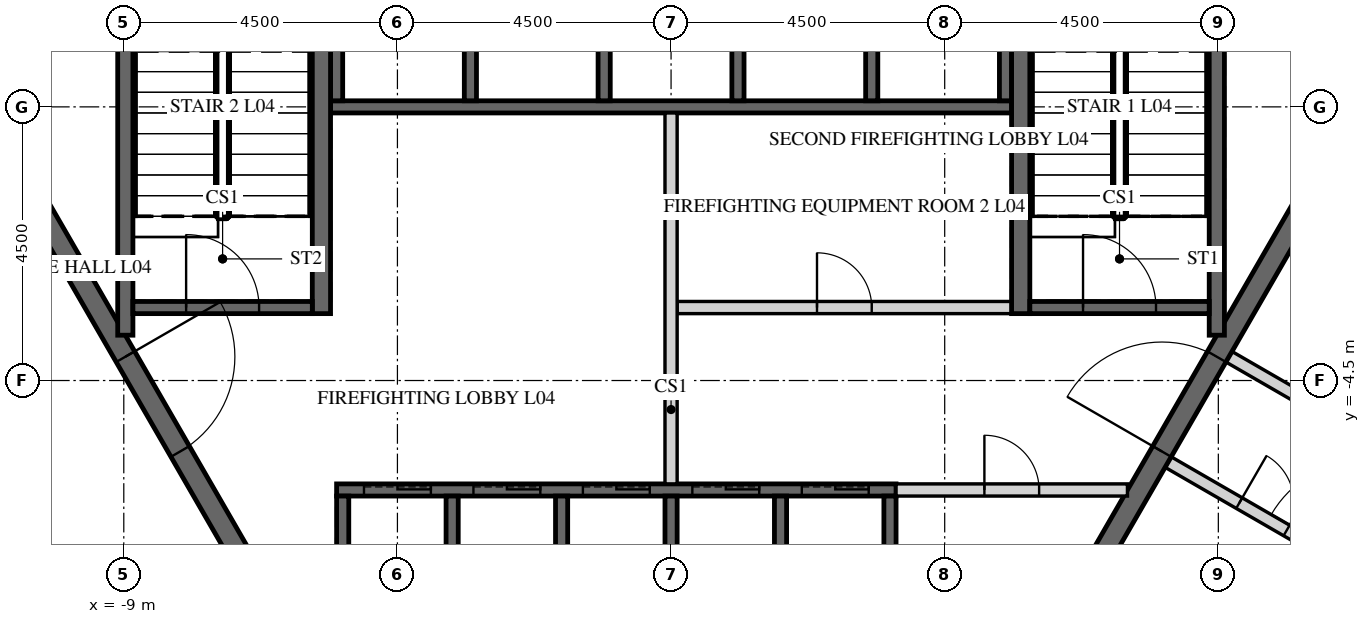
"""IFC4 building model, lengths in metres.
Left out: names, types, materials, properties, quantities, classifications, styles, units other than length and angle.
Written with IfcOpenShell. Run it as: python <this file> out.ifc"""

import sys

from ifc_helpers import new_model, si_unit, direction, frame, frame_2d, origin, place, context, subcontext, project, spatial, polyline, rectangle, outline, extrude, element, fill, save


model = new_model("IFC4")
c1 = context("Model", 3, precision=1e-05, world=origin(), true_north=direction((0.0, 1.0)))
c2 = subcontext(c1, "Body", "Model", "MODEL_VIEW")
j1 = project(units=[si_unit("LENGTHUNIT", "METRE"), si_unit("PLANEANGLEUNIT", "RADIAN")], contexts=[c1])
p1 = place(None, origin())
s1 = spatial("IfcSite", under=j1, at=p1, CompositionType="ELEMENT")
p2 = place(p1, origin())
s2 = spatial("IfcBuilding", under=s1, at=p2, CompositionType="ELEMENT")
p3 = place(p2, frame((0.0, 0.0, 26.0)))
s3 = spatial("IfcBuildingStorey", under=s2, at=p3, CompositionType="ELEMENT", Elevation=26.0)
p4 = place(p3, frame((-7.91, 13.7, -0.25), z_axis=(0.0, 0.0, 1.0), x_axis=(-0.499999880136, -0.866025472988, 0.0)))
e1 = element("IfcWall", 1, at=p4, inside=s3, PredefinedType="SHEAR", context=c2, shape_type="SweptSolid", body=[
    extrude(outline(polyline([(-0.173, -0.3), (15.993, -0.3), (15.646, 0.3), (0.173, 0.3), (-0.173, -0.3)])), origin(), (0.0, 0.0, 1.0), 5.45),
])
p5 = place(p4, frame((7.039, 0.0, 0.25)))
e2 = element("IfcOpeningElement", 2, at=p5, cuts=e1, PredefinedType="OPENING", context=c2, shape_type="SweptSolid", body=[
    extrude(rectangle(XDim=1.8, YDim=2.4, at=frame_2d((0.9, 1.2))), frame((0.0, 0.31, 0.0), z_axis=(0.0, -1.0, 0.0), x_axis=(1.0, 0.0, 0.0)), (0.0, 0.0, 1.0), 0.62),
])
p6 = place(p3, frame((-15.819, 0.0, -0.25), z_axis=(0.0, 0.0, 1.0), x_axis=(0.499999880136, -0.866025472988, 0.0)))
e3 = element("IfcWall", 3, at=p6, inside=s3, PredefinedType="SHEAR", context=c2, shape_type="SweptSolid", body=[
    extrude(outline(polyline([(-0.173, -0.3), (15.993, -0.3), (15.646, 0.3), (0.173, 0.3), (-0.173, -0.3)])), origin(), (0.0, 0.0, 1.0), 5.45),
])
p7 = place(p6, frame((6.981, 0.0, 0.25)))
e4 = element("IfcOpeningElement", 4, at=p7, cuts=e3, PredefinedType="OPENING", context=c2, shape_type="SweptSolid", body=[
    extrude(rectangle(XDim=1.8, YDim=2.4, at=frame_2d((0.9, 1.2))), frame((0.0, 0.31, 0.0), z_axis=(0.0, -1.0, 0.0), x_axis=(1.0, 0.0, 0.0)), (0.0, 0.0, 1.0), 0.62),
])
p8 = place(p3, frame((7.91, -13.7, -0.25), z_axis=(0.0, 0.0, 1.0), x_axis=(0.499999880136, 0.866025472988, 0.0)))
e5 = element("IfcWall", 5, at=p8, inside=s3, PredefinedType="SHEAR", context=c2, shape_type="SweptSolid", body=[
    extrude(outline(polyline([(-0.173, -0.3), (15.993, -0.3), (15.646, 0.3), (0.173, 0.3), (-0.173, -0.3)])), origin(), (0.0, 0.0, 1.0), 5.45),
])
p9 = place(p8, frame((7.039, 0.0, 0.25)))
e6 = element("IfcOpeningElement", 6, at=p9, cuts=e5, PredefinedType="OPENING", context=c2, shape_type="SweptSolid", body=[
    extrude(rectangle(XDim=1.8, YDim=2.4, at=frame_2d((0.9, 1.2))), frame((0.0, 0.31, 0.0), z_axis=(0.0, -1.0, 0.0), x_axis=(1.0, 0.0, 0.0)), (0.0, 0.0, 1.0), 0.62),
])
p10 = place(p3, frame((15.819, 0.0, -0.25), z_axis=(0.0, 0.0, 1.0), x_axis=(-0.499999880136, 0.866025472988, 0.0)))
e7 = element("IfcWall", 7, at=p10, inside=s3, PredefinedType="SHEAR", context=c2, shape_type="SweptSolid", body=[
    extrude(outline(polyline([(-0.173, -0.3), (15.993, -0.3), (15.646, 0.3), (0.173, 0.3), (-0.173, -0.3)])), origin(), (0.0, 0.0, 1.0), 5.45),
])
p11 = place(p10, frame((6.981, 0.0, 0.25)))
e8 = element("IfcOpeningElement", 8, at=p11, cuts=e7, PredefinedType="OPENING", context=c2, shape_type="SweptSolid", body=[
    extrude(rectangle(XDim=1.8, YDim=2.4, at=frame_2d((0.9, 1.2))), frame((0.0, 0.31, 0.0), z_axis=(0.0, -1.0, 0.0), x_axis=(1.0, 0.0, 0.0)), (0.0, 0.0, 1.0), 0.62),
])
p12 = place(p3, frame((-5.673, 9.825, -0.25), z_axis=(0.0, 0.0, 1.0), x_axis=(-0.499995046907, -0.866028263435, 0.0)))
e9 = element("IfcWall", 9, at=p12, inside=s3, PredefinedType="SHEAR", context=c2, shape_type="SweptSolid", body=[
    extrude(outline(polyline([(-0.101, -0.175), (11.446, -0.175), (11.244, 0.175), (0.101, 0.175), (-0.101, -0.175)])), origin(), (0.0, 0.0, 1.0), 5.45),
])
p13 = place(p12, frame((4.801, 0.0, 0.25)))
e10 = element("IfcOpeningElement", 10, at=p13, cuts=e9, PredefinedType="OPENING", context=c2, shape_type="SweptSolid", body=[
    extrude(rectangle(XDim=1.8, YDim=2.4, at=frame_2d((0.9, 1.2))), frame((0.0, 0.185, 0.0), z_axis=(0.0, -1.0, 0.0), x_axis=(1.0, 0.0, 0.0)), (0.0, 0.0, 1.0), 0.37),
])
p14 = place(p3, frame((-11.345, 0.0, -0.25), z_axis=(0.0, 0.0, 1.0), x_axis=(0.499995046907, -0.866028263435, 0.0)))
e11 = element("IfcWall", 11, at=p14, inside=s3, PredefinedType="SHEAR", context=c2, shape_type="SweptSolid", body=[
    extrude(outline(polyline([(-0.101, -0.175), (11.446, -0.175), (11.244, 0.175), (0.101, 0.175), (-0.101, -0.175)])), origin(), (0.0, 0.0, 1.0), 5.45),
])
p15 = place(p14, frame((4.744, 0.0, 0.25)))
e12 = element("IfcOpeningElement", 12, at=p15, cuts=e11, PredefinedType="OPENING", context=c2, shape_type="SweptSolid", body=[
    extrude(rectangle(XDim=1.8, YDim=2.4, at=frame_2d((0.9, 1.2))), frame((0.0, 0.185, 0.0), z_axis=(0.0, -1.0, 0.0), x_axis=(1.0, 0.0, 0.0)), (0.0, 0.0, 1.0), 0.37),
])
p16 = place(p3, frame((5.673, -9.825, -0.25), z_axis=(0.0, 0.0, 1.0), x_axis=(0.499995046907, 0.866028263435, 0.0)))
e13 = element("IfcWall", 13, at=p16, inside=s3, PredefinedType="SHEAR", context=c2, shape_type="SweptSolid", body=[
    extrude(outline(polyline([(-0.101, -0.175), (11.446, -0.175), (11.244, 0.175), (0.101, 0.175), (-0.101, -0.175)])), origin(), (0.0, 0.0, 1.0), 5.45),
])
p17 = place(p16, frame((4.801, 0.0, 0.25)))
e14 = element("IfcOpeningElement", 14, at=p17, cuts=e13, PredefinedType="OPENING", context=c2, shape_type="SweptSolid", body=[
    extrude(rectangle(XDim=1.8, YDim=2.4, at=frame_2d((0.9, 1.2))), frame((0.0, 0.185, 0.0), z_axis=(0.0, -1.0, 0.0), x_axis=(1.0, 0.0, 0.0)), (0.0, 0.0, 1.0), 0.37),
])
p18 = place(p3, frame((11.345, 0.0, -0.25), z_axis=(0.0, 0.0, 1.0), x_axis=(-0.499995046907, 0.866028263435, 0.0)))
e15 = element("IfcWall", 15, at=p18, inside=s3, PredefinedType="SHEAR", context=c2, shape_type="SweptSolid", body=[
    extrude(outline(polyline([(-0.101, -0.175), (11.446, -0.175), (11.244, 0.175), (0.101, 0.175), (-0.101, -0.175)])), origin(), (0.0, 0.0, 1.0), 5.45),
])
p19 = place(p18, frame((4.744, 0.0, 0.25)))
e16 = element("IfcOpeningElement", 16, at=p19, cuts=e15, PredefinedType="OPENING", context=c2, shape_type="SweptSolid", body=[
    extrude(rectangle(XDim=1.8, YDim=2.4, at=frame_2d((0.9, 1.2))), frame((0.0, 0.185, 0.0), z_axis=(0.0, -1.0, 0.0), x_axis=(1.0, 0.0, 0.0)), (0.0, 0.0, 1.0), 0.37),
])
p20 = place(p3, frame((-5.6, 0.0, -0.25), z_axis=(0.0, 0.0, 1.0), x_axis=(1.0, 0.0, 0.0)))
e17 = element("IfcWall", 17, at=p20, inside=s3, PredefinedType="SHEAR", context=c2, shape_type="SweptSolid", body=[
    extrude(rectangle(XDim=11.2, YDim=0.2, at=frame_2d((5.6, 0.0))), origin(), (0.0, 0.0, 1.0), 5.5),
])
for number, where, z_axis, x_axis in (
    (18, (-5.5, 0.1, -0.25), (0.0, 0.0, 1.0), (0.0, 1.0, 0.0)),
    (19, (-3.3, 0.1, -0.25), (0.0, 0.0, 1.0), (0.0, 1.0, 0.0)),
    (20, (-1.1, 0.1, -0.25), (0.0, 0.0, 1.0), (0.0, 1.0, 0.0)),
    (21, (1.1, 0.1, -0.25), (0.0, 0.0, 1.0), (0.0, 1.0, 0.0)),
    (22, (3.3, 0.1, -0.25), (0.0, 0.0, 1.0), (0.0, 1.0, 0.0)),
    (23, (5.5, 0.1, -0.25), (0.0, 0.0, 1.0), (0.0, 1.0, 0.0)),
):
    element("IfcWall", number, at=place(p3, frame(where, z_axis=z_axis, x_axis=x_axis)), inside=s3, PredefinedType="SHEAR", context=c2, shape_type="SweptSolid", body=[
        extrude(rectangle(XDim=3.1, YDim=0.2, at=frame_2d((1.55, 0.0))), origin(), (0.0, 0.0, 1.0), 5.5),
    ])
p21 = place(p3, frame((-5.5, -6.3, -0.25), z_axis=(0.0, 0.0, 1.0), x_axis=(1.0, 0.0, 0.0)))
e24 = element("IfcWall", 24, at=p21, inside=s3, PredefinedType="SHEAR", context=c2, shape_type="SweptSolid", body=[
    extrude(rectangle(XDim=9.2, YDim=0.2, at=frame_2d((4.6, 0.0))), origin(), (0.0, 0.0, 1.0), 5.5),
])
p22 = place(p21, frame((0.45, 0.0, 0.25)))
e25 = element("IfcOpeningElement", 25, at=p22, cuts=e24, PredefinedType="OPENING", context=c2, shape_type="SweptSolid", body=[
    extrude(rectangle(XDim=1.1, YDim=2.1, at=frame_2d((0.55, 1.05))), frame((0.0, 0.11, 0.0), z_axis=(0.0, -1.0, 0.0), x_axis=(1.0, 0.0, 0.0)), (0.0, 0.0, 1.0), 0.22),
])
p23 = place(p21, frame((2.25, 0.0, 0.25)))
e26 = element("IfcOpeningElement", 26, at=p23, cuts=e24, PredefinedType="OPENING", context=c2, shape_type="SweptSolid", body=[
    extrude(rectangle(XDim=1.1, YDim=2.1, at=frame_2d((0.55, 1.05))), frame((0.0, 0.11, 0.0), z_axis=(0.0, -1.0, 0.0), x_axis=(1.0, 0.0, 0.0)), (0.0, 0.0, 1.0), 0.22),
])
p24 = place(p21, frame((4.05, 0.0, 0.25)))
e27 = element("IfcOpeningElement", 27, at=p24, cuts=e24, PredefinedType="OPENING", context=c2, shape_type="SweptSolid", body=[
    extrude(rectangle(XDim=1.1, YDim=2.1, at=frame_2d((0.55, 1.05))), frame((0.0, 0.11, 0.0), z_axis=(0.0, -1.0, 0.0), x_axis=(1.0, 0.0, 0.0)), (0.0, 0.0, 1.0), 0.22),
])
p25 = place(p21, frame((5.85, 0.0, 0.25)))
e28 = element("IfcOpeningElement", 28, at=p25, cuts=e24, PredefinedType="OPENING", context=c2, shape_type="SweptSolid", body=[
    extrude(rectangle(XDim=1.1, YDim=2.1, at=frame_2d((0.55, 1.05))), frame((0.0, 0.11, 0.0), z_axis=(0.0, -1.0, 0.0), x_axis=(1.0, 0.0, 0.0)), (0.0, 0.0, 1.0), 0.22),
])
p26 = place(p21, frame((7.65, 0.0, 0.25)))
e29 = element("IfcOpeningElement", 29, at=p26, cuts=e24, PredefinedType="OPENING", context=c2, shape_type="SweptSolid", body=[
    extrude(rectangle(XDim=1.1, YDim=2.1, at=frame_2d((0.55, 1.05))), frame((0.0, 0.11, 0.0), z_axis=(0.0, -1.0, 0.0), x_axis=(1.0, 0.0, 0.0)), (0.0, 0.0, 1.0), 0.22),
])
for number, where, z_axis, x_axis in (
    (30, (-5.4, -9.3, -0.25), (0.0, 0.0, 1.0), (0.0, 1.0, 0.0)),
    (31, (-3.6, -9.3, -0.25), (0.0, 0.0, 1.0), (0.0, 1.0, 0.0)),
    (32, (-1.8, -9.3, -0.25), (0.0, 0.0, 1.0), (0.0, 1.0, 0.0)),
    (33, (0.0, -9.3, -0.25), (0.0, 0.0, 1.0), (0.0, 1.0, 0.0)),
    (34, (1.8, -9.3, -0.25), (0.0, 0.0, 1.0), (0.0, 1.0, 0.0)),
    (35, (3.6, -9.3, -0.25), (0.0, 0.0, 1.0), (0.0, 1.0, 0.0)),
):
    element("IfcWall", number, at=place(p3, frame(where, z_axis=z_axis, x_axis=x_axis)), inside=s3, PredefinedType="SHEAR", context=c2, shape_type="SweptSolid", body=[
        extrude(rectangle(XDim=2.9, YDim=0.2, at=frame_2d((1.45, 0.0))), origin(), (0.0, 0.0, 1.0), 5.5),
    ])
p27 = place(p3, frame((0.1, -3.3, 0.0), z_axis=(0.0, 0.0, 1.0), x_axis=(1.0, 0.0, 0.0)))
e36 = element("IfcWall", 36, at=p27, inside=s3, PredefinedType="PARTITIONING", context=c2, shape_type="SweptSolid", body=[
    extrude(rectangle(XDim=5.5, YDim=0.2, at=frame_2d((2.75, 0.0))), origin(), (0.0, 0.0, 1.0), 5.25),
])
p28 = place(p27, frame((2.3, 0.0, 0.0)))
e37 = element("IfcOpeningElement", 37, at=p28, cuts=e36, PredefinedType="OPENING", context=c2, shape_type="SweptSolid", body=[
    extrude(rectangle(XDim=0.9, YDim=2.1, at=frame_2d((0.45, 1.05))), frame((0.0, 0.11, 0.0), z_axis=(0.0, -1.0, 0.0), x_axis=(1.0, 0.0, 0.0)), (0.0, 0.0, 1.0), 0.22),
])
p29 = place(p3, frame((0.0, -6.2, 0.0), z_axis=(0.0, 0.0, 1.0), x_axis=(0.0, 1.0, 0.0)))
e38 = element("IfcWall", 38, at=p29, inside=s3, PredefinedType="PARTITIONING", context=c2, shape_type="SweptSolid", body=[
    extrude(rectangle(XDim=6.1, YDim=0.2, at=frame_2d((3.05, 0.0))), origin(), (0.0, 0.0, 1.0), 5.25),
])
p30 = place(p3, frame((3.7, -6.3, 0.0), z_axis=(0.0, 0.0, 1.0), x_axis=(1.0, 0.0, 0.0)))
e39 = element("IfcWall", 39, at=p30, inside=s3, PredefinedType="PARTITIONING", context=c2, shape_type="SweptSolid", body=[
    extrude(rectangle(XDim=3.806, YDim=0.2, at=frame_2d((1.903, 0.0))), origin(), (0.0, 0.0, 1.0), 5.25),
])
p31 = place(p30, frame((1.453, 0.0, 0.0)))
e40 = element("IfcOpeningElement", 40, at=p31, cuts=e39, PredefinedType="OPENING", context=c2, shape_type="SweptSolid", body=[
    extrude(rectangle(XDim=0.9, YDim=2.1, at=frame_2d((0.45, 1.05))), frame((0.0, 0.11, 0.0), z_axis=(0.0, -1.0, 0.0), x_axis=(1.0, 0.0, 0.0)), (0.0, 0.0, 1.0), 0.22),
])
p32 = place(p3, frame((9.175, -4.109, 0.0), z_axis=(0.0, 0.0, 1.0), x_axis=(0.865989465428, -0.500062241894, 0.0)))
e41 = element("IfcWall", 41, at=p32, inside=s3, PredefinedType="PARTITIONING", context=c2, shape_type="SweptSolid", body=[
    extrude(rectangle(XDim=3.4, YDim=0.2, at=frame_2d((1.7, 0.0))), origin(), (0.0, 0.0, 1.0), 5.25),
])
p33 = place(p32, frame((1.351, 0.0, 0.0)))
e42 = element("IfcOpeningElement", 42, at=p33, cuts=e41, PredefinedType="OPENING", context=c2, shape_type="SweptSolid", body=[
    extrude(rectangle(XDim=0.9, YDim=2.1, at=frame_2d((0.45, 1.05))), frame((0.0, 0.11, 0.0), z_axis=(0.0, -1.0, 0.0), x_axis=(1.0, 0.0, 0.0)), (0.0, 0.0, 1.0), 0.22),
])
p34 = place(p3, frame((8.175, -5.841, 0.0), z_axis=(0.0, 0.0, 1.0), x_axis=(0.866020560687, -0.500008388397, 0.0)))
e43 = element("IfcWall", 43, at=p34, inside=s3, PredefinedType="PARTITIONING", context=c2, shape_type="SweptSolid", body=[
    extrude(rectangle(XDim=3.4, YDim=0.2, at=frame_2d((1.7, 0.0))), origin(), (0.0, 0.0, 1.0), 5.25),
])
p35 = place(p34, frame((1.35, 0.0, 0.0)))
e44 = element("IfcOpeningElement", 44, at=p35, cuts=e43, PredefinedType="OPENING", context=c2, shape_type="SweptSolid", body=[
    extrude(rectangle(XDim=0.9, YDim=2.1, at=frame_2d((0.45, 1.05))), frame((0.0, 0.11, 0.0), z_axis=(0.0, -1.0, 0.0), x_axis=(1.0, 0.0, 0.0)), (0.0, 0.0, 1.0), 0.22),
])
p36 = place(p3, frame((5.75, -3.4, -0.25), z_axis=(0.0, 0.0, 1.0), x_axis=(0.0, 1.0, 0.0)))
e45 = element("IfcWall", 45, at=p36, inside=s3, PredefinedType="SHEAR", context=c2, shape_type="SweptSolid", body=[
    extrude(rectangle(XDim=6.8, YDim=0.3, at=frame_2d((3.4, 0.0))), origin(), (0.0, 0.0, 1.0), 5.5),
])
p37 = place(p3, frame((8.975, -3.755, -0.25), z_axis=(0.0, 0.0, 1.0), x_axis=(0.0, 1.0, 0.0)))
e46 = element("IfcWall", 46, at=p37, inside=s3, PredefinedType="SHEAR", context=c2, shape_type="SweptSolid", body=[
    extrude(rectangle(XDim=7.51, YDim=0.25, at=frame_2d((3.755, 0.0))), origin(), (0.0, 0.0, 1.0), 5.5),
])
p38 = place(p3, frame((5.9, -3.3, -0.25), z_axis=(0.0, 0.0, 1.0), x_axis=(1.0, 0.0, 0.0)))
e47 = element("IfcWall", 47, at=p38, inside=s3, PredefinedType="SHEAR", context=c2, shape_type="SweptSolid", body=[
    extrude(rectangle(XDim=2.95, YDim=0.2, at=frame_2d((1.475, 0.0))), origin(), (0.0, 0.0, 1.0), 5.5),
])
p39 = place(p38, frame((0.875, 0.0, 0.25)))
e48 = element("IfcOpeningElement", 48, at=p39, cuts=e47, PredefinedType="OPENING", context=c2, shape_type="SweptSolid", body=[
    extrude(rectangle(XDim=1.2, YDim=2.4, at=frame_2d((0.6, 1.2))), frame((0.0, 0.11, 0.0), z_axis=(0.0, -1.0, 0.0), x_axis=(1.0, 0.0, 0.0)), (0.0, 0.0, 1.0), 0.22),
])
p40 = place(p3, frame((-5.75, -3.4, -0.25), z_axis=(0.0, 0.0, 1.0), x_axis=(0.0, 1.0, 0.0)))
e49 = element("IfcWall", 49, at=p40, inside=s3, PredefinedType="SHEAR", context=c2, shape_type="SweptSolid", body=[
    extrude(rectangle(XDim=6.8, YDim=0.3, at=frame_2d((3.4, 0.0))), origin(), (0.0, 0.0, 1.0), 5.5),
])
p41 = place(p3, frame((-8.975, -3.755, -0.25), z_axis=(0.0, 0.0, 1.0), x_axis=(0.0, 1.0, 0.0)))
e50 = element("IfcWall", 50, at=p41, inside=s3, PredefinedType="SHEAR", context=c2, shape_type="SweptSolid", body=[
    extrude(rectangle(XDim=7.51, YDim=0.25, at=frame_2d((3.755, 0.0))), origin(), (0.0, 0.0, 1.0), 5.5),
])
p42 = place(p3, frame((-8.85, -3.3, -0.25), z_axis=(0.0, 0.0, 1.0), x_axis=(1.0, 0.0, 0.0)))
e51 = element("IfcWall", 51, at=p42, inside=s3, PredefinedType="SHEAR", context=c2, shape_type="SweptSolid", body=[
    extrude(rectangle(XDim=2.95, YDim=0.2, at=frame_2d((1.475, 0.0))), origin(), (0.0, 0.0, 1.0), 5.5),
])
p43 = place(p42, frame((0.875, 0.0, 0.25)))
e52 = element("IfcOpeningElement", 52, at=p43, cuts=e51, PredefinedType="OPENING", context=c2, shape_type="SweptSolid", body=[
    extrude(rectangle(XDim=1.2, YDim=2.4, at=frame_2d((0.6, 1.2))), frame((0.0, 0.11, 0.0), z_axis=(0.0, -1.0, 0.0), x_axis=(1.0, 0.0, 0.0)), (0.0, 0.0, 1.0), 0.22),
])
p44 = place(p15, origin())
e53 = element("IfcDoor", 53, at=p44, inside=s3, OperationType="DOUBLE_DOOR_SINGLE_SWING", PredefinedType="DOOR", context=c2, shape_type="SweptSolid", body=[
    extrude(rectangle(XDim=1.8, YDim=2.4, at=frame_2d((0.9, 1.2))), frame((0.0, 0.025, 0.0), z_axis=(0.0, -1.0, 0.0), x_axis=(1.0, 0.0, 0.0)), (0.0, 0.0, 1.0), 0.05),
])
fill(e12, e53)
p45 = place(p17, origin())
e54 = element("IfcDoor", 54, at=p45, inside=s3, OperationType="DOUBLE_DOOR_SINGLE_SWING", PredefinedType="DOOR", context=c2, shape_type="SweptSolid", body=[
    extrude(rectangle(XDim=1.8, YDim=2.4, at=frame_2d((0.9, 1.2))), frame((0.0, 0.025, 0.0), z_axis=(0.0, -1.0, 0.0), x_axis=(1.0, 0.0, 0.0)), (0.0, 0.0, 1.0), 0.05),
])
fill(e14, e54)
p46 = place(p28, origin())
e55 = element("IfcDoor", 55, at=p46, inside=s3, OperationType="SINGLE_SWING_LEFT", PredefinedType="DOOR", context=c2, shape_type="SweptSolid", body=[
    extrude(rectangle(XDim=0.9, YDim=2.1, at=frame_2d((0.45, 1.05))), frame((0.0, 0.025, 0.0), z_axis=(0.0, -1.0, 0.0), x_axis=(1.0, 0.0, 0.0)), (0.0, 0.0, 1.0), 0.05),
])
fill(e37, e55)
p47 = place(p31, origin())
e56 = element("IfcDoor", 56, at=p47, inside=s3, OperationType="SINGLE_SWING_LEFT", PredefinedType="DOOR", context=c2, shape_type="SweptSolid", body=[
    extrude(rectangle(XDim=0.9, YDim=2.1, at=frame_2d((0.45, 1.05))), frame((0.0, 0.025, 0.0), z_axis=(0.0, -1.0, 0.0), x_axis=(1.0, 0.0, 0.0)), (0.0, 0.0, 1.0), 0.05),
])
fill(e40, e56)
p48 = place(p35, origin())
e57 = element("IfcDoor", 57, at=p48, inside=s3, OperationType="SINGLE_SWING_LEFT", PredefinedType="DOOR", context=c2, shape_type="SweptSolid", body=[
    extrude(rectangle(XDim=0.9, YDim=2.1, at=frame_2d((0.45, 1.05))), frame((0.0, 0.025, 0.0), z_axis=(0.0, -1.0, 0.0), x_axis=(1.0, 0.0, 0.0)), (0.0, 0.0, 1.0), 0.05),
])
fill(e44, e57)
p49 = place(p39, origin())
e58 = element("IfcDoor", 58, at=p49, inside=s3, OperationType="SINGLE_SWING_LEFT", PredefinedType="DOOR", context=c2, shape_type="SweptSolid", body=[
    extrude(rectangle(XDim=1.2, YDim=2.4, at=frame_2d((0.6, 1.2))), frame((0.0, 0.025, 0.0), z_axis=(0.0, -1.0, 0.0), x_axis=(1.0, 0.0, 0.0)), (0.0, 0.0, 1.0), 0.05),
])
fill(e48, e58)
p50 = place(p43, origin())
e59 = element("IfcDoor", 59, at=p50, inside=s3, OperationType="SINGLE_SWING_LEFT", PredefinedType="DOOR", context=c2, shape_type="SweptSolid", body=[
    extrude(rectangle(XDim=1.2, YDim=2.4, at=frame_2d((0.6, 1.2))), frame((0.0, 0.025, 0.0), z_axis=(0.0, -1.0, 0.0), x_axis=(1.0, 0.0, 0.0)), (0.0, 0.0, 1.0), 0.05),
])
fill(e52, e59)
p51 = place(p22, origin())
e60 = element("IfcDoor", 60, at=p51, inside=s3, OperationType="SLIDING_TO_LEFT", PredefinedType="DOOR", context=c2, shape_type="SweptSolid", body=[
    extrude(rectangle(XDim=1.1, YDim=2.1, at=frame_2d((0.55, 1.05))), frame((0.0, 0.025, 0.0), z_axis=(0.0, -1.0, 0.0), x_axis=(1.0, 0.0, 0.0)), (0.0, 0.0, 1.0), 0.05),
])
fill(e25, e60)
p52 = place(p23, origin())
e61 = element("IfcDoor", 61, at=p52, inside=s3, OperationType="SLIDING_TO_LEFT", PredefinedType="DOOR", context=c2, shape_type="SweptSolid", body=[
    extrude(rectangle(XDim=1.1, YDim=2.1, at=frame_2d((0.55, 1.05))), frame((0.0, 0.025, 0.0), z_axis=(0.0, -1.0, 0.0), x_axis=(1.0, 0.0, 0.0)), (0.0, 0.0, 1.0), 0.05),
])
fill(e26, e61)
p53 = place(p24, origin())
e62 = element("IfcDoor", 62, at=p53, inside=s3, OperationType="SLIDING_TO_LEFT", PredefinedType="DOOR", context=c2, shape_type="SweptSolid", body=[
    extrude(rectangle(XDim=1.1, YDim=2.1, at=frame_2d((0.55, 1.05))), frame((0.0, 0.025, 0.0), z_axis=(0.0, -1.0, 0.0), x_axis=(1.0, 0.0, 0.0)), (0.0, 0.0, 1.0), 0.05),
])
fill(e27, e62)
p54 = place(p25, origin())
e63 = element("IfcDoor", 63, at=p54, inside=s3, OperationType="SLIDING_TO_LEFT", PredefinedType="DOOR", context=c2, shape_type="SweptSolid", body=[
    extrude(rectangle(XDim=1.1, YDim=2.1, at=frame_2d((0.55, 1.05))), frame((0.0, 0.025, 0.0), z_axis=(0.0, -1.0, 0.0), x_axis=(1.0, 0.0, 0.0)), (0.0, 0.0, 1.0), 0.05),
])
fill(e28, e63)
p55 = place(p26, origin())
e64 = element("IfcDoor", 64, at=p55, inside=s3, OperationType="SLIDING_TO_LEFT", PredefinedType="DOOR", context=c2, shape_type="SweptSolid", body=[
    extrude(rectangle(XDim=1.1, YDim=2.1, at=frame_2d((0.55, 1.05))), frame((0.0, 0.025, 0.0), z_axis=(0.0, -1.0, 0.0), x_axis=(1.0, 0.0, 0.0)), (0.0, 0.0, 1.0), 0.05),
])
fill(e29, e64)
save(model, sys.argv[1])
